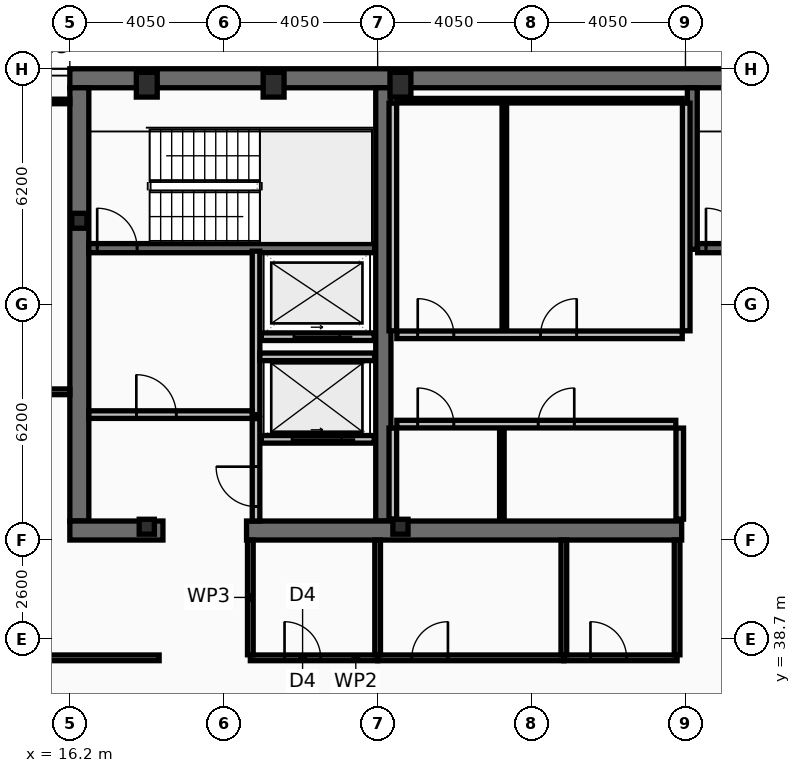
"""IFC4 building model, lengths in metres.
Left out: names, types, materials, properties, quantities, classifications, styles, units other than length and angle.
Written with IfcOpenShell. Run it as: python <this file> out.ifc"""

import sys

from ifc_helpers import new_model, si_unit, direction, frame, frame_2d, origin, origin_2d, place, context, subcontext, project, spatial, rectangle, hollow_rectangle, i_section, extrude, element, fill, save


model = new_model("IFC4")
c1 = context("Model", 3, precision=1e-05, world=origin(), true_north=direction((0.0, 1.0)))
c2 = subcontext(c1, "Body", "Model", "MODEL_VIEW")
j1 = project(units=[si_unit("LENGTHUNIT", "METRE"), si_unit("PLANEANGLEUNIT", "RADIAN")], contexts=[c1])
p1 = place(None, origin())
s1 = spatial("IfcSite", under=j1, at=p1, CompositionType="ELEMENT")
p2 = place(p1, origin())
s2 = spatial("IfcBuilding", under=s1, at=p2, CompositionType="ELEMENT")
p3 = place(p2, frame((0.0, 0.0, 339.8)))
s3 = spatial("IfcBuildingStorey", under=s2, at=p3, CompositionType="ELEMENT", Elevation=339.8)
p4 = place(p3, frame((16.2, 53.45, 0.0), z_axis=(0.0, 0.0, 1.0), x_axis=(1.0, 0.0, 0.0)))
e1 = element("IfcWall", 1, at=p4, inside=s3, PredefinedType="SHEAR", context=c2, shape_type="SweptSolid", body=[
    extrude(rectangle(XDim=40.5, YDim=0.5, at=frame_2d((20.25, 0.0))), origin(), (0.0, 0.0, 1.0), 3.44),
])
p5 = place(p3, frame((16.45, 41.8, 0.0), z_axis=(0.0, 0.0, 1.0), x_axis=(0.0, 1.0, 0.0)))
e2 = element("IfcWall", 2, at=p5, inside=s3, PredefinedType="SHEAR", context=c2, shape_type="SweptSolid", body=[
    extrude(rectangle(XDim=11.4, YDim=0.5, at=frame_2d((5.7, 0.0))), origin(), (0.0, 0.0, 1.0), 3.44),
])
p6 = place(p3, frame((24.45, 41.8, 0.0), z_axis=(0.0, 0.0, 1.0), x_axis=(0.0, 1.0, 0.0)))
e3 = element("IfcWall", 3, at=p6, inside=s3, PredefinedType="SHEAR", context=c2, shape_type="SweptSolid", body=[
    extrude(rectangle(XDim=11.4, YDim=0.4, at=frame_2d((5.7, 0.0))), origin(), (0.0, 0.0, 1.0), 3.44),
])
p7 = place(p3, frame((18.65, 41.55, 0.0), z_axis=(0.0, 0.0, 1.0), x_axis=(-1.0, 0.0, 0.0)))
e4 = element("IfcWall", 4, at=p7, inside=s3, PredefinedType="SHEAR", context=c2, shape_type="SweptSolid", body=[
    extrude(rectangle(XDim=2.45, YDim=0.5, at=frame_2d((1.225, 0.0))), origin(), (0.0, 0.0, 1.0), 3.44),
])
p8 = place(p3, frame((32.3, 41.55, 0.0), z_axis=(0.0, 0.0, 1.0), x_axis=(-1.0, 0.0, 0.0)))
e5 = element("IfcWall", 5, at=p8, inside=s3, PredefinedType="SHEAR", context=c2, shape_type="SweptSolid", body=[
    extrude(rectangle(XDim=11.45, YDim=0.5, at=frame_2d((5.725, 0.0))), origin(), (0.0, 0.0, 1.0), 3.44),
])
p9 = place(p3, frame((32.58, 48.95, 0.0), z_axis=(0.0, 0.0, 1.0), x_axis=(0.0, 1.0, 0.0)))
e6 = element("IfcWall", 6, at=p9, inside=s3, PredefinedType="SHEAR", context=c2, shape_type="SweptSolid", body=[
    extrude(rectangle(XDim=4.25, YDim=0.26, at=frame_2d((2.125, 0.0))), origin(), (0.0, 0.0, 1.0), 3.44),
])
p10 = place(p3, frame((16.7, 48.98, 0.0), z_axis=(0.0, 0.0, 1.0), x_axis=(1.0, 0.0, 0.0)))
e7 = element("IfcWall", 7, at=p10, inside=s3, PredefinedType="SHEAR", context=c2, shape_type="SweptSolid", body=[
    extrude(rectangle(XDim=7.52, YDim=0.24, at=frame_2d((3.76, 0.0))), origin(), (0.0, 0.0, 1.0), 3.44),
])
p11 = place(p10, frame((0.22, 0.0, 0.0)))
e8 = element("IfcOpeningElement", 8, at=p11, cuts=e7, PredefinedType="OPENING", context=c2, shape_type="SweptSolid", body=[
    extrude(rectangle(XDim=1.05, YDim=2.15, at=frame_2d((0.525, 1.075))), frame((0.0, 0.13, 0.0), z_axis=(0.0, -1.0, 0.0), x_axis=(1.0, 0.0, 0.0)), (0.0, 0.0, 1.0), 0.26),
])
p12 = place(p3, frame((32.72, 48.98, 0.0), z_axis=(0.0, 0.0, 1.0), x_axis=(1.0, 0.0, 0.0)))
e9 = element("IfcWall", 9, at=p12, inside=s3, PredefinedType="SHEAR", context=c2, shape_type="SweptSolid", body=[
    extrude(rectangle(XDim=7.56, YDim=0.24, at=frame_2d((3.78, 0.0))), origin(), (0.0, 0.0, 1.0), 3.44),
])
p13 = place(p12, frame((0.22, 0.0, 0.0)))
e10 = element("IfcOpeningElement", 10, at=p13, cuts=e9, PredefinedType="OPENING", context=c2, shape_type="SweptSolid", body=[
    extrude(rectangle(XDim=1.05, YDim=2.15, at=frame_2d((0.525, 1.075))), frame((0.0, 0.13, 0.0), z_axis=(0.0, -1.0, 0.0), x_axis=(1.0, 0.0, 0.0)), (0.0, 0.0, 1.0), 0.26),
])
for number, where, z_axis, x_axis in (
    (11, (18.225, 53.28, 0.0), (0.0, 0.0, 1.0), (1.0, 0.0, 0.0)),
    (12, (21.562, 53.28, 0.0), (0.0, 0.0, 1.0), (1.0, 0.0, 0.0)),
    (13, (24.9, 53.28, 0.0), (0.0, 0.0, 1.0), (1.0, 0.0, 0.0)),
):
    element("IfcColumn", number, at=place(p3, frame(where, z_axis=z_axis, x_axis=x_axis)), inside=s3, PredefinedType="COLUMN", context=c2, shape_type="SweptSolid", body=[
        extrude(hollow_rectangle(XDim=0.55, YDim=0.65, WallThickness=0.04, at=origin_2d()), origin(), (0.0, 0.0, 1.0), 3.6),
    ])
for number, where, z_axis, x_axis in (
    (14, (16.45, 49.7, 0.0), (0.0, 0.0, 1.0), (1.0, 0.0, 0.0)),
    (15, (18.225, 41.65, 0.0), (0.0, 0.0, 1.0), (1.0, 0.0, 0.0)),
    (16, (24.9, 41.65, 0.0), (0.0, 0.0, 1.0), (1.0, 0.0, 0.0)),
):
    element("IfcColumn", number, at=place(p3, frame(where, z_axis=z_axis, x_axis=x_axis)), inside=s3, PredefinedType="COLUMN", context=c2, shape_type="SweptSolid", body=[
        extrude(i_section(OverallWidth=0.399, OverallDepth=0.393, WebThickness=0.023, FlangeThickness=0.037, at=origin_2d()), origin(), (0.0, 0.0, 1.0), 3.6),
    ])
p14 = place(p3, frame((24.21, 43.95, 0.0), z_axis=(0.0, 0.0, 1.0), x_axis=(-1.0, 0.0, 0.0)))
e17 = element("IfcWall", 17, at=p14, inside=s3, PredefinedType="PARTITIONING", context=c2, shape_type="SweptSolid", body=[
    extrude(rectangle(XDim=2.97, YDim=0.2, at=frame_2d((1.485, 0.0))), origin(), (0.0, 0.0, 1.0), 3.44),
])
p15 = place(p14, frame((0.86, 0.0, 0.0)))
e18 = element("IfcOpeningElement", 18, at=p15, cuts=e17, PredefinedType="OPENING", context=c2, shape_type="SweptSolid", body=[
    extrude(rectangle(XDim=1.3, YDim=2.18, at=frame_2d((0.65, 1.09))), frame((0.0, 0.11, 0.0), z_axis=(0.0, -1.0, 0.0), x_axis=(1.0, 0.0, 0.0)), (0.0, 0.0, 1.0), 0.22),
])
p16 = place(p3, frame((24.21, 46.65, 0.0), z_axis=(0.0, 0.0, 1.0), x_axis=(-1.0, 0.0, 0.0)))
e19 = element("IfcWall", 19, at=p16, inside=s3, PredefinedType="PARTITIONING", context=c2, shape_type="SweptSolid", body=[
    extrude(rectangle(XDim=2.97, YDim=0.2, at=frame_2d((1.485, 0.0))), origin(), (0.0, 0.0, 1.0), 3.44),
])
p17 = place(p16, frame((0.91, 0.0, 0.0)))
e20 = element("IfcOpeningElement", 20, at=p17, cuts=e19, PredefinedType="OPENING", context=c2, shape_type="SweptSolid", body=[
    extrude(rectangle(XDim=1.2, YDim=2.18, at=frame_2d((0.6, 1.09))), frame((0.0, 0.11, 0.0), z_axis=(0.0, -1.0, 0.0), x_axis=(1.0, 0.0, 0.0)), (0.0, 0.0, 1.0), 0.22),
])
p18 = place(p3, frame((21.1, 44.6, 0.0), z_axis=(0.0, 0.0, 1.0), x_axis=(0.0, 1.0, 0.0)))
e21 = element("IfcWall", 21, at=p18, inside=s3, PredefinedType="PARTITIONING", context=c2, shape_type="SweptSolid", body=[
    extrude(rectangle(XDim=4.3, YDim=0.2, at=frame_2d((2.15, 0.0))), origin(), (0.0, 0.0, 1.0), 3.44),
])
p19 = place(p3, frame((16.7, 44.6, 0.0), z_axis=(0.0, 0.0, 1.0), x_axis=(1.0, 0.0, 0.0)))
e22 = element("IfcWall", 22, at=p19, inside=s3, PredefinedType="PARTITIONING", context=c2, shape_type="SweptSolid", body=[
    extrude(rectangle(XDim=4.3, YDim=0.2, at=frame_2d((2.15, 0.0))), origin(), (0.0, 0.0, 1.0), 3.44),
])
p20 = place(p19, frame((1.25, 0.0, 0.0)))
e23 = element("IfcOpeningElement", 23, at=p20, cuts=e22, PredefinedType="OPENING", context=c2, shape_type="SweptSolid", body=[
    extrude(rectangle(XDim=1.05, YDim=2.15, at=frame_2d((0.525, 1.075))), frame((0.0, 0.11, 0.0), z_axis=(0.0, -1.0, 0.0), x_axis=(1.0, 0.0, 0.0)), (0.0, 0.0, 1.0), 0.22),
])
p21 = place(p3, frame((21.2, 46.12, 0.0), z_axis=(0.0, 0.0, 1.0), x_axis=(1.0, 0.0, 0.0)))
e24 = element("IfcWall", 24, at=p21, inside=s3, PredefinedType="PARTITIONING", context=c2, shape_type="SweptSolid", body=[
    extrude(rectangle(XDim=3.02, YDim=0.2, at=frame_2d((1.51, 0.0))), origin(), (0.0, 0.0, 1.0), 3.44),
])
p22 = place(p3, frame((21.1, 41.8, 0.0), z_axis=(0.0, 0.0, 1.0), x_axis=(0.0, 1.0, 0.0)))
e25 = element("IfcWall", 25, at=p22, inside=s3, PredefinedType="PARTITIONING", context=c2, shape_type="SweptSolid", body=[
    extrude(rectangle(XDim=2.695, YDim=0.2, at=frame_2d((1.348, 0.0))), origin(), (0.0, 0.0, 1.0), 3.44),
])
p23 = place(p22, frame((0.38, 0.0, 0.0)))
e26 = element("IfcOpeningElement", 26, at=p23, cuts=e25, PredefinedType="OPENING", context=c2, shape_type="SweptSolid", body=[
    extrude(rectangle(XDim=1.05, YDim=2.15, at=frame_2d((0.525, 1.075))), frame((0.0, 0.11, 0.0), z_axis=(0.0, -1.0, 0.0), x_axis=(1.0, 0.0, 0.0)), (0.0, 0.0, 1.0), 0.22),
])
for number, where, z_axis, x_axis in (
    (27, (24.7, 46.805, 0.0), (0.0, 0.0, 1.0), (0.0, 1.0, 0.0)),
    (28, (32.42, 46.805, 0.0), (0.0, 0.0, 1.0), (0.0, 1.0, 0.0)),
):
    element("IfcWall", number, at=place(p3, frame(where, z_axis=z_axis, x_axis=x_axis)), inside=s3, PredefinedType="PARTITIONING", context=c2, shape_type="SweptSolid", body=[
        extrude(rectangle(XDim=5.99, YDim=0.2, at=frame_2d((2.995, 0.0))), origin(), (0.0, 0.0, 1.0), 3.44),
    ])
p24 = place(p3, frame((24.805, 52.86, 0.0), z_axis=(0.0, 0.0, 1.0), x_axis=(1.0, 0.0, 0.0)))
e29 = element("IfcWall", 29, at=p24, inside=s3, PredefinedType="PARTITIONING", context=c2, shape_type="SweptSolid", body=[
    extrude(rectangle(XDim=7.51, YDim=0.12, at=frame_2d((3.755, 0.0))), origin(), (0.0, 0.0, 1.0), 3.44),
])
p25 = place(p3, frame((27.634, 46.805, 0.0), z_axis=(0.0, 0.0, 1.0), x_axis=(0.0, 1.0, 0.0)))
e30 = element("IfcWall", 30, at=p25, inside=s3, PredefinedType="PARTITIONING", context=c2, shape_type="SweptSolid", body=[
    extrude(rectangle(XDim=5.99, YDim=0.12, at=frame_2d((2.995, 0.0))), origin(), (0.0, 0.0, 1.0), 3.44),
])
p26 = place(p3, frame((24.805, 46.7, 0.0), z_axis=(0.0, 0.0, 1.0), x_axis=(1.0, 0.0, 0.0)))
e31 = element("IfcWall", 31, at=p26, inside=s3, PredefinedType="PARTITIONING", context=c2, shape_type="SweptSolid", body=[
    extrude(rectangle(XDim=7.51, YDim=0.2, at=frame_2d((3.755, 0.0))), origin(), (0.0, 0.0, 1.0), 3.44),
])
p27 = place(p26, frame((0.55, 0.0, 0.0)))
e32 = element("IfcOpeningElement", 32, at=p27, cuts=e31, PredefinedType="OPENING", context=c2, shape_type="SweptSolid", body=[
    extrude(rectangle(XDim=0.95, YDim=2.1, at=frame_2d((0.475, 1.05))), frame((0.0, 0.11, 0.0), z_axis=(0.0, -1.0, 0.0), x_axis=(1.0, 0.0, 0.0)), (0.0, 0.0, 1.0), 0.22),
])
p28 = place(p26, frame((3.784, 0.0, 0.0)))
e33 = element("IfcOpeningElement", 33, at=p28, cuts=e31, PredefinedType="OPENING", context=c2, shape_type="SweptSolid", body=[
    extrude(rectangle(XDim=0.95, YDim=2.1, at=frame_2d((0.475, 1.05))), frame((0.0, 0.11, 0.0), z_axis=(0.0, -1.0, 0.0), x_axis=(1.0, 0.0, 0.0)), (0.0, 0.0, 1.0), 0.22),
])
for number, where, z_axis, x_axis in (
    (34, (24.7, 41.85, 0.0), (0.0, 0.0, 1.0), (0.0, 1.0, 0.0)),
    (35, (32.25, 41.85, 0.0), (0.0, 0.0, 1.0), (0.0, 1.0, 0.0)),
):
    element("IfcWall", number, at=place(p3, frame(where, z_axis=z_axis, x_axis=x_axis)), inside=s3, PredefinedType="PARTITIONING", context=c2, shape_type="SweptSolid", body=[
        extrude(rectangle(XDim=2.395, YDim=0.2, at=frame_2d((1.198, 0.0))), origin(), (0.0, 0.0, 1.0), 3.44),
    ])
p29 = place(p3, frame((27.569, 41.85, 0.0), z_axis=(0.0, 0.0, 1.0), x_axis=(0.0, 1.0, 0.0)))
e36 = element("IfcWall", 36, at=p29, inside=s3, PredefinedType="PARTITIONING", context=c2, shape_type="SweptSolid", body=[
    extrude(rectangle(XDim=2.395, YDim=0.12, at=frame_2d((1.198, 0.0))), origin(), (0.0, 0.0, 1.0), 3.44),
])
p30 = place(p3, frame((24.805, 44.35, 0.0), z_axis=(0.0, 0.0, 1.0), x_axis=(1.0, 0.0, 0.0)))
e37 = element("IfcWall", 37, at=p30, inside=s3, PredefinedType="PARTITIONING", context=c2, shape_type="SweptSolid", body=[
    extrude(rectangle(XDim=7.34, YDim=0.2, at=frame_2d((3.67, 0.0))), origin(), (0.0, 0.0, 1.0), 3.44),
])
p31 = place(p30, frame((0.55, 0.0, 0.0)))
e38 = element("IfcOpeningElement", 38, at=p31, cuts=e37, PredefinedType="OPENING", context=c2, shape_type="SweptSolid", body=[
    extrude(rectangle(XDim=0.95, YDim=2.1, at=frame_2d((0.475, 1.05))), frame((0.0, 0.11, 0.0), z_axis=(0.0, -1.0, 0.0), x_axis=(1.0, 0.0, 0.0)), (0.0, 0.0, 1.0), 0.22),
])
p32 = place(p30, frame((3.719, 0.0, 0.0)))
e39 = element("IfcOpeningElement", 39, at=p32, cuts=e37, PredefinedType="OPENING", context=c2, shape_type="SweptSolid", body=[
    extrude(rectangle(XDim=0.95, YDim=2.1, at=frame_2d((0.475, 1.05))), frame((0.0, 0.11, 0.0), z_axis=(0.0, -1.0, 0.0), x_axis=(1.0, 0.0, 0.0)), (0.0, 0.0, 1.0), 0.22),
])
p33 = place(p3, frame((20.95, 38.2, 0.0), z_axis=(0.0, 0.0, 1.0), x_axis=(1.0, 0.0, 0.0)))
e40 = element("IfcWall", 40, at=p33, inside=s3, PredefinedType="PARTITIONING", context=c2, shape_type="SweptSolid", body=[
    extrude(rectangle(XDim=3.35, YDim=0.15, at=frame_2d((1.675, 0.0))), origin(), (0.0, 0.0, 1.0), 3.44),
])
p34 = place(p33, frame((0.9, 0.0, 0.0)))
e41 = element("IfcOpeningElement", 41, at=p34, cuts=e40, PredefinedType="OPENING", context=c2, shape_type="SweptSolid", body=[
    extrude(rectangle(XDim=0.95, YDim=2.05, at=frame_2d((0.475, 1.025))), frame((0.0, 0.085, 0.0), z_axis=(0.0, -1.0, 0.0), x_axis=(1.0, 0.0, 0.0)), (0.0, 0.0, 1.0), 0.17),
])
p35 = place(p3, frame((24.3, 38.2, 0.0), z_axis=(0.0, 0.0, 1.0), x_axis=(1.0, 0.0, 0.0)))
e42 = element("IfcWall", 42, at=p35, inside=s3, PredefinedType="PARTITIONING", context=c2, shape_type="SweptSolid", body=[
    extrude(rectangle(XDim=4.9, YDim=0.15, at=frame_2d((2.45, 0.0))), origin(), (0.0, 0.0, 1.0), 2.83),
])
p36 = place(p35, frame((0.9, 0.0, 0.0)))
e43 = element("IfcOpeningElement", 43, at=p36, cuts=e42, PredefinedType="OPENING", context=c2, shape_type="SweptSolid", body=[
    extrude(rectangle(XDim=0.95, YDim=2.05, at=frame_2d((0.475, 1.025))), frame((0.0, 0.085, 0.0), z_axis=(0.0, -1.0, 0.0), x_axis=(1.0, 0.0, 0.0)), (0.0, 0.0, 1.0), 0.17),
])
p37 = place(p3, frame((29.2, 38.2, 0.0), z_axis=(0.0, 0.0, 1.0), x_axis=(1.0, 0.0, 0.0)))
e44 = element("IfcWall", 44, at=p37, inside=s3, PredefinedType="PARTITIONING", context=c2, shape_type="SweptSolid", body=[
    extrude(rectangle(XDim=2.98, YDim=0.15, at=frame_2d((1.49, 0.0))), origin(), (0.0, 0.0, 1.0), 3.44),
])
p38 = place(p37, frame((0.7, 0.0, 0.0)))
e45 = element("IfcOpeningElement", 45, at=p38, cuts=e44, PredefinedType="OPENING", context=c2, shape_type="SweptSolid", body=[
    extrude(rectangle(XDim=0.95, YDim=2.05, at=frame_2d((0.475, 1.025))), frame((0.0, 0.085, 0.0), z_axis=(0.0, -1.0, 0.0), x_axis=(1.0, 0.0, 0.0)), (0.0, 0.0, 1.0), 0.17),
])
for number, where, z_axis, x_axis in (
    (46, (20.95, 38.28, 0.0), (0.0, 0.0, 1.0), (0.0, 1.0, 0.0)),
    (47, (24.3, 38.28, 0.0), (0.0, 0.0, 1.0), (0.0, 1.0, 0.0)),
    (48, (29.2, 38.28, 0.0), (0.0, 0.0, 1.0), (0.0, 1.0, 0.0)),
    (49, (32.18, 38.28, 0.0), (0.0, 0.0, 1.0), (0.0, 1.0, 0.0)),
):
    element("IfcWall", number, at=place(p3, frame(where, z_axis=z_axis, x_axis=x_axis)), inside=s3, PredefinedType="PARTITIONING", context=c2, shape_type="SweptSolid", body=[
        extrude(rectangle(XDim=3.02, YDim=0.15, at=frame_2d((1.51, 0.0))), origin(), (0.0, 0.0, 1.0), 3.44),
    ])
p39 = place(p3, frame((12.03, 38.2, 0.0), z_axis=(0.0, 0.0, 1.0), x_axis=(1.0, 0.0, 0.0)))
e50 = element("IfcWall", 50, at=p39, inside=s3, PredefinedType="PARTITIONING", context=c2, shape_type="SweptSolid", body=[
    extrude(rectangle(XDim=6.52, YDim=0.15, at=frame_2d((3.26, 0.0))), origin(), (0.0, 0.0, 1.0), 2.83),
])
p40 = place(p39, frame((2.32, 0.0, 0.0)))
e51 = element("IfcOpeningElement", 51, at=p40, cuts=e50, PredefinedType="OPENING", context=c2, shape_type="SweptSolid", body=[
    extrude(rectangle(XDim=0.95, YDim=2.05, at=frame_2d((0.475, 1.025))), frame((0.0, 0.085, 0.0), z_axis=(0.0, -1.0, 0.0), x_axis=(1.0, 0.0, 0.0)), (0.0, 0.0, 1.0), 0.17),
])
p41 = place(p3, frame((12.095, 45.2, 0.0), z_axis=(0.0, 0.0, 1.0), x_axis=(1.0, 0.0, 0.0)))
e52 = element("IfcWall", 52, at=p41, inside=s3, PredefinedType="PARTITIONING", context=c2, shape_type="SweptSolid", body=[
    extrude(rectangle(XDim=4.105, YDim=0.15, at=frame_2d((2.052, 0.0))), origin(), (0.0, 0.0, 1.0), 2.88),
])
p42 = place(p41, frame((2.32, 0.0, 0.0)))
e53 = element("IfcOpeningElement", 53, at=p42, cuts=e52, PredefinedType="OPENING", context=c2, shape_type="SweptSolid", body=[
    extrude(rectangle(XDim=0.9, YDim=2.05, at=frame_2d((0.45, 1.025))), frame((0.0, 0.085, 0.0), z_axis=(0.0, -1.0, 0.0), x_axis=(1.0, 0.0, 0.0)), (0.0, 0.0, 1.0), 0.17),
])
p43 = place(p3, frame((12.095, 52.84, 0.0), z_axis=(0.0, 0.0, 1.0), x_axis=(1.0, 0.0, 0.0)))
e54 = element("IfcWall", 54, at=p43, inside=s3, PredefinedType="PARTITIONING", context=c2, shape_type="SweptSolid", body=[
    extrude(rectangle(XDim=4.105, YDim=0.12, at=frame_2d((2.052, 0.0))), origin(), (0.0, 0.0, 1.0), 3.44),
])
p44 = place(p11, origin())
e55 = element("IfcDoor", 55, at=p44, inside=s3, OperationType="SINGLE_SWING_LEFT", PredefinedType="DOOR", context=c2, shape_type="SweptSolid", body=[
    extrude(rectangle(XDim=1.05, YDim=2.15, at=frame_2d((0.525, 1.075))), frame((0.0, 0.025, 0.0), z_axis=(0.0, -1.0, 0.0), x_axis=(1.0, 0.0, 0.0)), (0.0, 0.0, 1.0), 0.05),
])
fill(e8, e55)
p45 = place(p13, origin())
e56 = element("IfcDoor", 56, at=p45, inside=s3, OperationType="SINGLE_SWING_LEFT", PredefinedType="DOOR", context=c2, shape_type="SweptSolid", body=[
    extrude(rectangle(XDim=1.05, YDim=2.15, at=frame_2d((0.525, 1.075))), frame((0.0, 0.025, 0.0), z_axis=(0.0, -1.0, 0.0), x_axis=(1.0, 0.0, 0.0)), (0.0, 0.0, 1.0), 0.05),
])
fill(e10, e56)
p46 = place(p15, origin())
e57 = element("IfcDoor", 57, at=p46, inside=s3, OperationType="SLIDING_TO_LEFT", PredefinedType="DOOR", context=c2, shape_type="SweptSolid", body=[
    extrude(rectangle(XDim=1.3, YDim=2.18, at=frame_2d((0.65, 1.09))), frame((0.0, 0.025, 0.0), z_axis=(0.0, -1.0, 0.0), x_axis=(1.0, 0.0, 0.0)), (0.0, 0.0, 1.0), 0.05),
])
fill(e18, e57)
p47 = place(p17, origin())
e58 = element("IfcDoor", 58, at=p47, inside=s3, OperationType="SLIDING_TO_LEFT", PredefinedType="DOOR", context=c2, shape_type="SweptSolid", body=[
    extrude(rectangle(XDim=1.2, YDim=2.18, at=frame_2d((0.6, 1.09))), frame((0.0, 0.025, 0.0), z_axis=(0.0, -1.0, 0.0), x_axis=(1.0, 0.0, 0.0)), (0.0, 0.0, 1.0), 0.05),
])
fill(e20, e58)
p48 = place(p20, origin())
e59 = element("IfcDoor", 59, at=p48, inside=s3, OperationType="SINGLE_SWING_LEFT", PredefinedType="DOOR", context=c2, shape_type="SweptSolid", body=[
    extrude(rectangle(XDim=1.05, YDim=2.15, at=frame_2d((0.525, 1.075))), frame((0.0, 0.025, 0.0), z_axis=(0.0, -1.0, 0.0), x_axis=(1.0, 0.0, 0.0)), (0.0, 0.0, 1.0), 0.05),
])
fill(e23, e59)
p49 = place(p23, origin())
e60 = element("IfcDoor", 60, at=p49, inside=s3, OperationType="SINGLE_SWING_RIGHT", PredefinedType="DOOR", context=c2, shape_type="SweptSolid", body=[
    extrude(rectangle(XDim=1.05, YDim=2.15, at=frame_2d((0.525, 1.075))), frame((0.0, 0.025, 0.0), z_axis=(0.0, -1.0, 0.0), x_axis=(1.0, 0.0, 0.0)), (0.0, 0.0, 1.0), 0.05),
])
fill(e26, e60)
p50 = place(p27, origin())
e61 = element("IfcDoor", 61, at=p50, inside=s3, OperationType="SINGLE_SWING_LEFT", PredefinedType="DOOR", context=c2, shape_type="SweptSolid", body=[
    extrude(rectangle(XDim=0.95, YDim=2.1, at=frame_2d((0.475, 1.05))), frame((0.0, 0.025, 0.0), z_axis=(0.0, -1.0, 0.0), x_axis=(1.0, 0.0, 0.0)), (0.0, 0.0, 1.0), 0.05),
])
fill(e32, e61)
p51 = place(p28, origin())
e62 = element("IfcDoor", 62, at=p51, inside=s3, OperationType="SINGLE_SWING_RIGHT", PredefinedType="DOOR", context=c2, shape_type="SweptSolid", body=[
    extrude(rectangle(XDim=0.95, YDim=2.1, at=frame_2d((0.475, 1.05))), frame((0.0, 0.025, 0.0), z_axis=(0.0, -1.0, 0.0), x_axis=(1.0, 0.0, 0.0)), (0.0, 0.0, 1.0), 0.05),
])
fill(e33, e62)
p52 = place(p31, origin())
e63 = element("IfcDoor", 63, at=p52, inside=s3, OperationType="SINGLE_SWING_LEFT", PredefinedType="DOOR", context=c2, shape_type="SweptSolid", body=[
    extrude(rectangle(XDim=0.95, YDim=2.1, at=frame_2d((0.475, 1.05))), frame((0.0, 0.025, 0.0), z_axis=(0.0, -1.0, 0.0), x_axis=(1.0, 0.0, 0.0)), (0.0, 0.0, 1.0), 0.05),
])
fill(e38, e63)
p53 = place(p32, origin())
e64 = element("IfcDoor", 64, at=p53, inside=s3, OperationType="SINGLE_SWING_RIGHT", PredefinedType="DOOR", context=c2, shape_type="SweptSolid", body=[
    extrude(rectangle(XDim=0.95, YDim=2.1, at=frame_2d((0.475, 1.05))), frame((0.0, 0.025, 0.0), z_axis=(0.0, -1.0, 0.0), x_axis=(1.0, 0.0, 0.0)), (0.0, 0.0, 1.0), 0.05),
])
fill(e39, e64)
p54 = place(p34, origin())
e65 = element("IfcDoor", 65, at=p54, inside=s3, OperationType="SINGLE_SWING_LEFT", PredefinedType="DOOR", context=c2, shape_type="SweptSolid", body=[
    extrude(rectangle(XDim=0.95, YDim=2.05, at=frame_2d((0.475, 1.025))), frame((0.0, 0.025, 0.0), z_axis=(0.0, -1.0, 0.0), x_axis=(1.0, 0.0, 0.0)), (0.0, 0.0, 1.0), 0.05),
])
fill(e41, e65)
p55 = place(p36, origin())
e66 = element("IfcDoor", 66, at=p55, inside=s3, OperationType="SINGLE_SWING_RIGHT", PredefinedType="DOOR", context=c2, shape_type="SweptSolid", body=[
    extrude(rectangle(XDim=0.95, YDim=2.05, at=frame_2d((0.475, 1.025))), frame((0.0, 0.025, 0.0), z_axis=(0.0, -1.0, 0.0), x_axis=(1.0, 0.0, 0.0)), (0.0, 0.0, 1.0), 0.05),
])
fill(e43, e66)
p56 = place(p38, origin())
e67 = element("IfcDoor", 67, at=p56, inside=s3, OperationType="SINGLE_SWING_LEFT", PredefinedType="DOOR", context=c2, shape_type="SweptSolid", body=[
    extrude(rectangle(XDim=0.95, YDim=2.05, at=frame_2d((0.475, 1.025))), frame((0.0, 0.025, 0.0), z_axis=(0.0, -1.0, 0.0), x_axis=(1.0, 0.0, 0.0)), (0.0, 0.0, 1.0), 0.05),
])
fill(e45, e67)
save(model, sys.argv[1])
